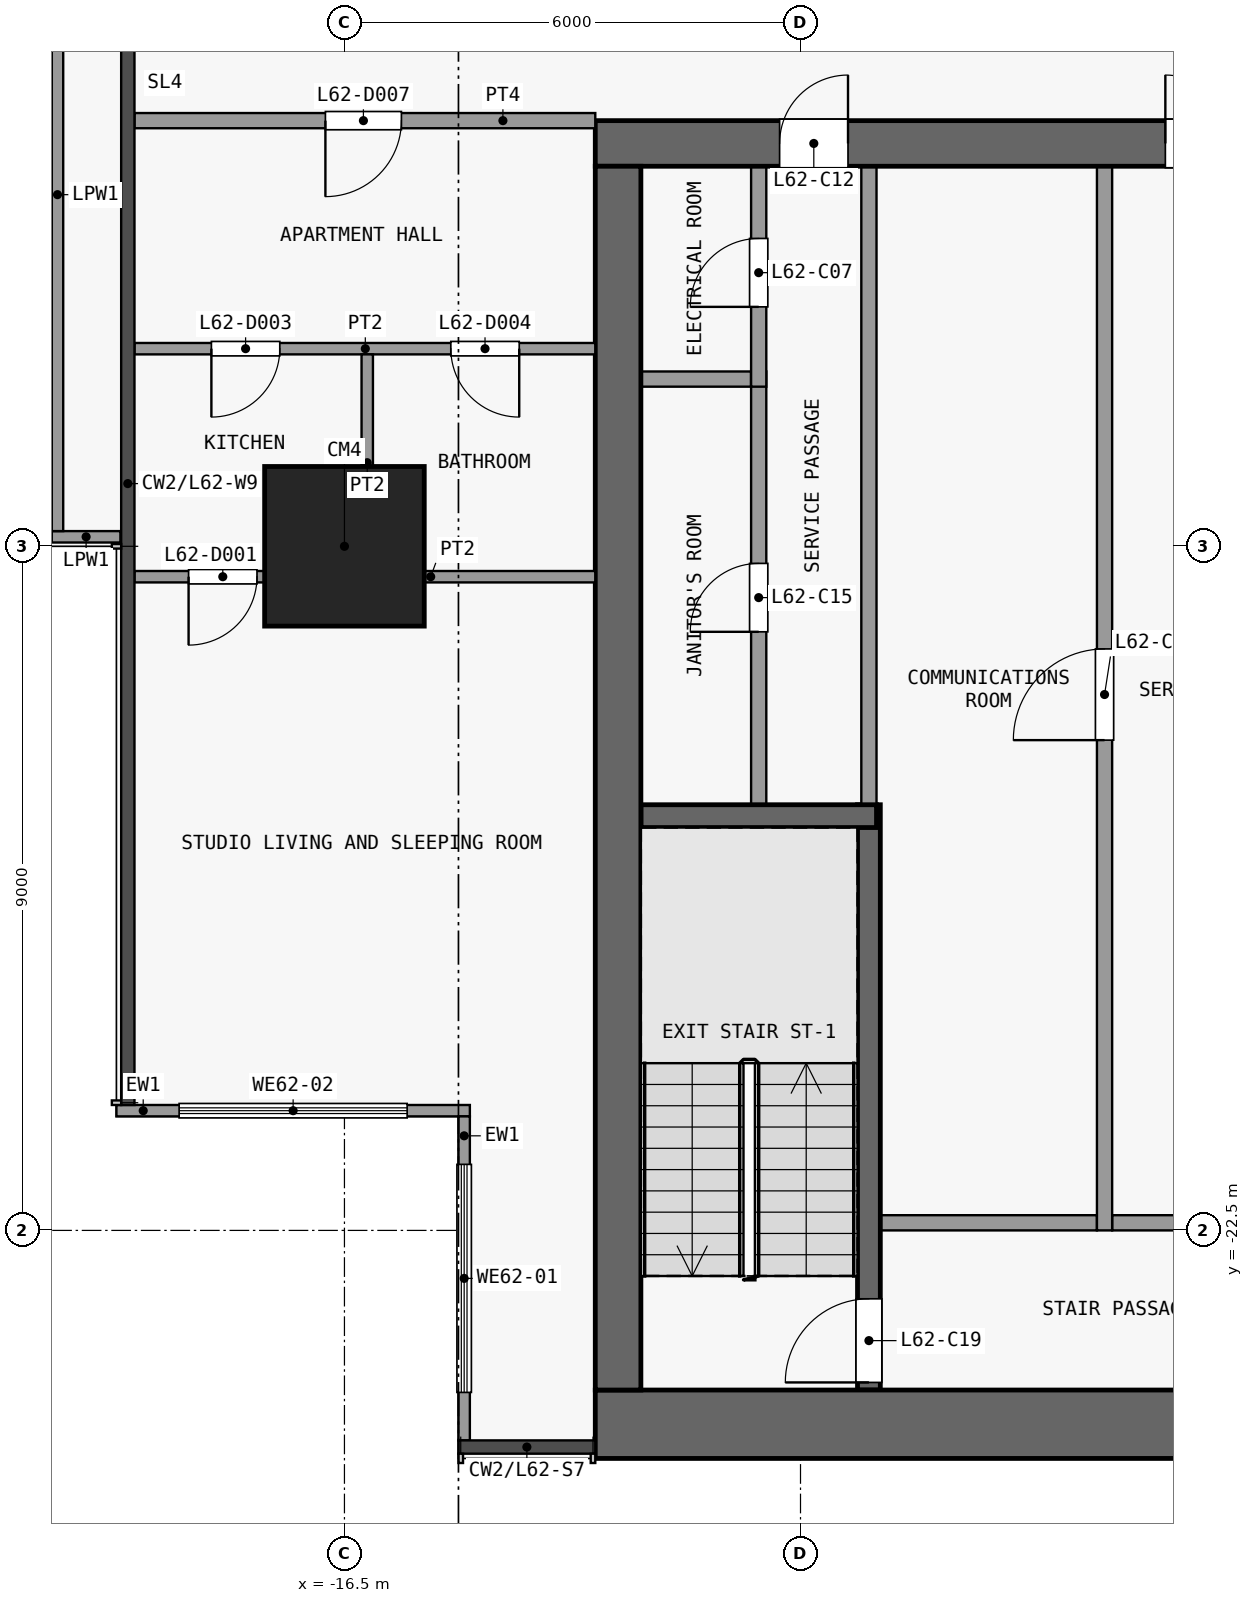
"""IFC4 building model, lengths in metres.
Left out: names, types, materials, properties, quantities, classifications, styles, units other than length and angle.
Written with IfcOpenShell. Run it as: python <this file> out.ifc"""

import sys

from ifc_helpers import new_model, si_unit, direction, frame, frame_2d, origin, origin_2d, place, context, subcontext, project, spatial, rectangle, extrude, element, fill, save


model = new_model("IFC4")
c1 = context("Model", 3, precision=1e-05, world=origin(), true_north=direction((0.0, 1.0)))
c2 = subcontext(c1, "Body", "Model", "MODEL_VIEW")
j1 = project(units=[si_unit("LENGTHUNIT", "METRE"), si_unit("PLANEANGLEUNIT", "RADIAN")], contexts=[c1])
p1 = place(None, origin())
s1 = spatial("IfcSite", under=j1, at=p1, CompositionType="ELEMENT")
p2 = place(p1, origin())
s2 = spatial("IfcBuilding", under=s1, at=p2, CompositionType="ELEMENT")
p3 = place(p2, frame((0.0, 0.0, 244.7)))
s3 = spatial("IfcBuildingStorey", under=s2, at=p3, CompositionType="ELEMENT", Elevation=244.7)
p4 = place(p3, frame((-16.5, -13.5, 0.0), z_axis=(0.0, 0.0, 1.0), x_axis=(1.0, 0.0, 0.0)))
e1 = element("IfcColumn", 1, at=p4, inside=s3, PredefinedType="COLUMN", context=c2, shape_type="SweptSolid", body=[
    extrude(rectangle(XDim=2.1, YDim=2.1, at=origin_2d()), origin(), (0.0, 0.0, 1.0), 3.6),
])
p5 = place(p3, frame((-13.2, -25.05, 0.0), z_axis=(0.0, 0.0, 1.0), x_axis=(1.0, 0.0, 0.0)))
e2 = element("IfcWall", 2, at=p5, inside=s3, PredefinedType="SHEAR", context=c2, shape_type="SweptSolid", body=[
    extrude(rectangle(XDim=26.4, YDim=0.9, at=frame_2d((13.2, 0.0))), origin(), (0.0, 0.0, 1.0), 3.15),
])
p6 = place(p3, frame((-13.2, -8.2, 0.0), z_axis=(0.0, 0.0, 1.0), x_axis=(1.0, 0.0, 0.0)))
e3 = element("IfcWall", 3, at=p6, inside=s3, PredefinedType="SHEAR", context=c2, shape_type="SweptSolid", body=[
    extrude(rectangle(XDim=26.4, YDim=0.6, at=frame_2d((13.2, 0.0))), origin(), (0.0, 0.0, 1.0), 3.15),
])
p7 = place(p6, frame((7.5, 0.0, 0.0)))
e4 = element("IfcOpeningElement", 4, at=p7, cuts=e3, PredefinedType="OPENING", context=c2, shape_type="SweptSolid", body=[
    extrude(rectangle(XDim=1.8, YDim=2.1, at=frame_2d((0.9, 1.05))), frame((0.0, 0.31, 0.0), z_axis=(0.0, -1.0, 0.0), x_axis=(1.0, 0.0, 0.0)), (0.0, 0.0, 1.0), 0.62),
])
p8 = place(p6, frame((17.1, 0.0, 0.0)))
e5 = element("IfcOpeningElement", 5, at=p8, cuts=e3, PredefinedType="OPENING", context=c2, shape_type="SweptSolid", body=[
    extrude(rectangle(XDim=1.8, YDim=2.1, at=frame_2d((0.9, 1.05))), frame((0.0, 0.31, 0.0), z_axis=(0.0, -1.0, 0.0), x_axis=(1.0, 0.0, 0.0)), (0.0, 0.0, 1.0), 0.62),
])
p9 = place(p6, frame((2.425, 0.0, 0.0)))
e6 = element("IfcOpeningElement", 6, at=p9, cuts=e3, PredefinedType="OPENING", context=c2, shape_type="SweptSolid", body=[
    extrude(rectangle(XDim=0.9, YDim=2.1, at=frame_2d((0.45, 1.05))), frame((0.0, 0.31, 0.0), z_axis=(0.0, -1.0, 0.0), x_axis=(1.0, 0.0, 0.0)), (0.0, 0.0, 1.0), 0.62),
])
p10 = place(p6, frame((23.075, 0.0, 0.0)))
e7 = element("IfcOpeningElement", 7, at=p10, cuts=e3, PredefinedType="OPENING", context=c2, shape_type="SweptSolid", body=[
    extrude(rectangle(XDim=0.9, YDim=2.1, at=frame_2d((0.45, 1.05))), frame((0.0, 0.31, 0.0), z_axis=(0.0, -1.0, 0.0), x_axis=(1.0, 0.0, 0.0)), (0.0, 0.0, 1.0), 0.62),
])
p11 = place(p3, frame((-12.9, -24.6, 0.0), z_axis=(0.0, 0.0, 1.0), x_axis=(0.0, 1.0, 0.0)))
e8 = element("IfcWall", 8, at=p11, inside=s3, PredefinedType="SHEAR", context=c2, shape_type="SweptSolid", body=[
    extrude(rectangle(XDim=16.1, YDim=0.6, at=frame_2d((8.05, 0.0))), origin(), (0.0, 0.0, 1.0), 3.15),
])
p12 = place(p3, frame((-9.45, -22.4, 0.0), z_axis=(0.0, 0.0, 1.0), x_axis=(1.0, 0.0, 0.0)))
e9 = element("IfcWall", 9, at=p12, inside=s3, PredefinedType="PARTITIONING", context=c2, shape_type="SweptSolid", body=[
    extrude(rectangle(XDim=2.85, YDim=0.2, at=frame_2d((1.425, 0.0))), origin(), (0.0, 0.0, 1.0), 3.15),
])
p13 = place(p3, frame((-3.25, -22.4, 0.0), z_axis=(0.0, 0.0, 1.0), x_axis=(-1.0, 0.0, 0.0)))
e10 = element("IfcWall", 10, at=p13, inside=s3, PredefinedType="PARTITIONING", context=c2, shape_type="SweptSolid", body=[
    extrude(rectangle(XDim=3.15, YDim=0.2, at=frame_2d((1.575, 0.0))), origin(), (0.0, 0.0, 1.0), 3.15),
])
p14 = place(p13, frame((0.8, 0.0, 0.0)))
e11 = element("IfcOpeningElement", 11, at=p14, cuts=e10, PredefinedType="OPENING", context=c2, shape_type="SweptSolid", body=[
    extrude(rectangle(XDim=1.5, YDim=2.1, at=frame_2d((0.75, 1.05))), frame((0.0, 0.11, 0.0), z_axis=(0.0, -1.0, 0.0), x_axis=(1.0, 0.0, 0.0)), (0.0, 0.0, 1.0), 0.22),
])
p15 = place(p3, frame((-12.6, -17.05, 0.0), z_axis=(0.0, 0.0, 1.0), x_axis=(1.0, 0.0, 0.0)))
e12 = element("IfcWall", 12, at=p15, inside=s3, PredefinedType="SHEAR", context=c2, shape_type="SweptSolid", body=[
    extrude(rectangle(XDim=3.1, YDim=0.3, at=frame_2d((1.55, 0.0))), origin(), (0.0, 0.0, 1.0), 3.15),
])
p16 = place(p3, frame((-12.6, -11.3, 0.0), z_axis=(0.0, 0.0, 1.0), x_axis=(1.0, 0.0, 0.0)))
e13 = element("IfcWall", 13, at=p16, inside=s3, PredefinedType="PARTITIONING", context=c2, shape_type="SweptSolid", body=[
    extrude(rectangle(XDim=1.45, YDim=0.2, at=frame_2d((0.725, 0.0))), origin(), (0.0, 0.0, 1.0), 3.15),
])
p17 = place(p3, frame((-11.05, -16.9, 0.0), z_axis=(0.0, 0.0, 1.0), x_axis=(0.0, 1.0, 0.0)))
e14 = element("IfcWall", 14, at=p17, inside=s3, PredefinedType="PARTITIONING", context=c2, shape_type="SweptSolid", body=[
    extrude(rectangle(XDim=5.7, YDim=0.2, at=frame_2d((2.85, 0.0))), origin(), (0.0, 0.0, 1.0), 3.15),
])
p18 = place(p17, frame((2.275, 0.0, 0.0)))
e15 = element("IfcOpeningElement", 15, at=p18, cuts=e14, PredefinedType="OPENING", context=c2, shape_type="SweptSolid", body=[
    extrude(rectangle(XDim=0.9, YDim=2.1, at=frame_2d((0.45, 1.05))), frame((0.0, 0.11, 0.0), z_axis=(0.0, -1.0, 0.0), x_axis=(1.0, 0.0, 0.0)), (0.0, 0.0, 1.0), 0.22),
])
p19 = place(p3, frame((-11.05, -11.4, 0.0), z_axis=(0.0, 0.0, 1.0), x_axis=(0.0, 1.0, 0.0)))
e16 = element("IfcWall", 16, at=p19, inside=s3, PredefinedType="PARTITIONING", context=c2, shape_type="SweptSolid", body=[
    extrude(rectangle(XDim=2.9, YDim=0.2, at=frame_2d((1.45, 0.0))), origin(), (0.0, 0.0, 1.0), 3.15),
])
p20 = place(p19, frame((1.05, 0.0, 0.0)))
e17 = element("IfcOpeningElement", 17, at=p20, cuts=e16, PredefinedType="OPENING", context=c2, shape_type="SweptSolid", body=[
    extrude(rectangle(XDim=0.9, YDim=2.1, at=frame_2d((0.45, 1.05))), frame((0.0, 0.11, 0.0), z_axis=(0.0, -1.0, 0.0), x_axis=(1.0, 0.0, 0.0)), (0.0, 0.0, 1.0), 0.22),
])
p21 = place(p3, frame((-9.6, -24.6, 0.0), z_axis=(0.0, 0.0, 1.0), x_axis=(0.0, 1.0, 0.0)))
e18 = element("IfcWall", 18, at=p21, inside=s3, PredefinedType="SHEAR", context=c2, shape_type="SweptSolid", body=[
    extrude(rectangle(XDim=7.7, YDim=0.3, at=frame_2d((3.85, 0.0))), origin(), (0.0, 0.0, 1.0), 3.15),
])
p22 = place(p21, frame((0.1, 0.0, 0.0)))
e19 = element("IfcOpeningElement", 19, at=p22, cuts=e18, PredefinedType="OPENING", context=c2, shape_type="SweptSolid", body=[
    extrude(rectangle(XDim=1.1, YDim=2.1, at=frame_2d((0.55, 1.05))), frame((0.0, 0.16, 0.0), z_axis=(0.0, -1.0, 0.0), x_axis=(1.0, 0.0, 0.0)), (0.0, 0.0, 1.0), 0.32),
])
p23 = place(p3, frame((-9.6, -16.9, 0.0), z_axis=(0.0, 0.0, 1.0), x_axis=(0.0, 1.0, 0.0)))
e20 = element("IfcWall", 20, at=p23, inside=s3, PredefinedType="PARTITIONING", context=c2, shape_type="SweptSolid", body=[
    extrude(rectangle(XDim=8.4, YDim=0.2, at=frame_2d((4.2, 0.0))), origin(), (0.0, 0.0, 1.0), 3.15),
])
p24 = place(p3, frame((-6.5, -22.5, 0.0), z_axis=(0.0, 0.0, 1.0), x_axis=(0.0, 1.0, 0.0)))
e21 = element("IfcWall", 21, at=p24, inside=s3, PredefinedType="PARTITIONING", context=c2, shape_type="SweptSolid", body=[
    extrude(rectangle(XDim=14.0, YDim=0.2, at=frame_2d((7.0, 0.0))), origin(), (0.0, 0.0, 1.0), 3.15),
])
p25 = place(p24, frame((6.45, 0.0, 0.0)))
e22 = element("IfcOpeningElement", 22, at=p25, cuts=e21, PredefinedType="OPENING", context=c2, shape_type="SweptSolid", body=[
    extrude(rectangle(XDim=1.2, YDim=2.1, at=frame_2d((0.6, 1.05))), frame((0.0, 0.11, 0.0), z_axis=(0.0, -1.0, 0.0), x_axis=(1.0, 0.0, 0.0)), (0.0, 0.0, 1.0), 0.22),
])
p26 = place(p3, frame((-14.925, -25.262, 0.0), z_axis=(0.0, 0.0, 1.0), x_axis=(0.0, 1.0, 0.0)))
e23 = element("IfcWall", 23, at=p26, inside=s3, PredefinedType="SOLIDWALL", context=c2, shape_type="SweptSolid", body=[
    extrude(rectangle(XDim=4.262, YDim=0.15, at=frame_2d((2.131, 0.0))), origin(), (0.0, 0.0, 1.0), 3.15),
])
p27 = place(p26, frame((0.631, 0.0, 0.9)))
e24 = element("IfcOpeningElement", 24, at=p27, cuts=e23, PredefinedType="OPENING", context=c2, shape_type="SweptSolid", body=[
    extrude(rectangle(XDim=3.0, YDim=2.4, at=frame_2d((1.5, 1.2))), frame((0.0, 0.085, 0.0), z_axis=(0.0, -1.0, 0.0), x_axis=(1.0, 0.0, 0.0)), (0.0, 0.0, 1.0), 0.17),
])
p28 = place(p3, frame((-14.85, -20.925, 0.0), z_axis=(0.0, 0.0, 1.0), x_axis=(-1.0, 0.0, 0.0)))
e25 = element("IfcWall", 25, at=p28, inside=s3, PredefinedType="SOLIDWALL", context=c2, shape_type="SweptSolid", body=[
    extrude(rectangle(XDim=4.65, YDim=0.15, at=frame_2d((2.325, 0.0))), origin(), (0.0, 0.0, 1.0), 3.15),
])
p29 = place(p28, frame((0.825, 0.0, 0.9)))
e26 = element("IfcOpeningElement", 26, at=p29, cuts=e25, PredefinedType="OPENING", context=c2, shape_type="SweptSolid", body=[
    extrude(rectangle(XDim=3.0, YDim=2.4, at=frame_2d((1.5, 1.2))), frame((0.0, 0.085, 0.0), z_axis=(0.0, -1.0, 0.0), x_axis=(1.0, 0.0, 0.0)), (0.0, 0.0, 1.0), 0.17),
])
p30 = place(p3, frame((-19.448, -13.375, 0.0), z_axis=(0.0, 0.0, 1.0), x_axis=(-1.0, 0.0, 0.0)))
e27 = element("IfcWall", 27, at=p30, inside=s3, PredefinedType="PARAPET", context=c2, shape_type="SweptSolid", body=[
    extrude(rectangle(XDim=0.903, YDim=0.15, at=frame_2d((0.451, 0.0))), origin(), (0.0, 0.0, 1.0), 1.15),
])
p31 = place(p3, frame((-20.275, -13.3, 0.0), z_axis=(0.0, 0.0, 1.0), x_axis=(0.0, 1.0, 0.0)))
e28 = element("IfcWall", 28, at=p31, inside=s3, PredefinedType="PARAPET", context=c2, shape_type="SweptSolid", body=[
    extrude(rectangle(XDim=8.853, YDim=0.15, at=frame_2d((4.426, 0.0))), origin(), (0.0, 0.0, 1.0), 1.15),
])
p32 = place(p3, frame((-19.262, -13.9, 0.0), z_axis=(0.0, 0.0, 1.0), x_axis=(1.0, 0.0, 0.0)))
e29 = element("IfcWall", 29, at=p32, inside=s3, PredefinedType="PARTITIONING", context=c2, shape_type="SweptSolid", body=[
    extrude(rectangle(XDim=6.062, YDim=0.15, at=frame_2d((3.031, 0.0))), origin(), (0.0, 0.0, 1.0), 3.15),
])
p33 = place(p32, frame((0.712, 0.0, 0.0)))
e30 = element("IfcOpeningElement", 30, at=p33, cuts=e29, PredefinedType="OPENING", context=c2, shape_type="SweptSolid", body=[
    extrude(rectangle(XDim=0.9, YDim=2.1, at=frame_2d((0.45, 1.05))), frame((0.0, 0.085, 0.0), z_axis=(0.0, -1.0, 0.0), x_axis=(1.0, 0.0, 0.0)), (0.0, 0.0, 1.0), 0.17),
])
p34 = place(p3, frame((-19.262, -10.9, 0.0), z_axis=(0.0, 0.0, 1.0), x_axis=(1.0, 0.0, 0.0)))
e31 = element("IfcWall", 31, at=p34, inside=s3, PredefinedType="PARTITIONING", context=c2, shape_type="SweptSolid", body=[
    extrude(rectangle(XDim=6.062, YDim=0.15, at=frame_2d((3.031, 0.0))), origin(), (0.0, 0.0, 1.0), 3.15),
])
p35 = place(p34, frame((1.012, 0.0, 0.0)))
e32 = element("IfcOpeningElement", 32, at=p35, cuts=e31, PredefinedType="OPENING", context=c2, shape_type="SweptSolid", body=[
    extrude(rectangle(XDim=0.9, YDim=2.1, at=frame_2d((0.45, 1.05))), frame((0.0, 0.085, 0.0), z_axis=(0.0, -1.0, 0.0), x_axis=(1.0, 0.0, 0.0)), (0.0, 0.0, 1.0), 0.17),
])
p36 = place(p34, frame((4.162, 0.0, 0.0)))
e33 = element("IfcOpeningElement", 33, at=p36, cuts=e31, PredefinedType="OPENING", context=c2, shape_type="SweptSolid", body=[
    extrude(rectangle(XDim=0.9, YDim=2.1, at=frame_2d((0.45, 1.05))), frame((0.0, 0.085, 0.0), z_axis=(0.0, -1.0, 0.0), x_axis=(1.0, 0.0, 0.0)), (0.0, 0.0, 1.0), 0.17),
])
p37 = place(p3, frame((-19.262, -7.9, 0.0), z_axis=(0.0, 0.0, 1.0), x_axis=(1.0, 0.0, 0.0)))
e34 = element("IfcWall", 34, at=p37, inside=s3, PredefinedType="PARTITIONING", context=c2, shape_type="SweptSolid", body=[
    extrude(rectangle(XDim=6.062, YDim=0.2, at=frame_2d((3.031, 0.0))), origin(), (0.0, 0.0, 1.0), 3.15),
])
p38 = place(p37, frame((2.512, 0.0, 0.0)))
e35 = element("IfcOpeningElement", 35, at=p38, cuts=e34, PredefinedType="OPENING", context=c2, shape_type="SweptSolid", body=[
    extrude(rectangle(XDim=1.0, YDim=2.1, at=frame_2d((0.5, 1.05))), frame((0.0, 0.11, 0.0), z_axis=(0.0, -1.0, 0.0), x_axis=(1.0, 0.0, 0.0)), (0.0, 0.0, 1.0), 0.22),
])
p39 = place(p3, frame((-16.2, -13.825, 0.0), z_axis=(0.0, 0.0, 1.0), x_axis=(0.0, 1.0, 0.0)))
e36 = element("IfcWall", 36, at=p39, inside=s3, PredefinedType="PARTITIONING", context=c2, shape_type="SweptSolid", body=[
    extrude(rectangle(XDim=2.85, YDim=0.15, at=frame_2d((1.425, 0.0))), origin(), (0.0, 0.0, 1.0), 3.15),
])
p40 = place(p7, origin())
e37 = element("IfcDoor", 37, at=p40, inside=s3, OperationType="DOUBLE_DOOR_SINGLE_SWING", PredefinedType="DOOR", context=c2, shape_type="SweptSolid", body=[
    extrude(rectangle(XDim=1.8, YDim=2.1, at=frame_2d((0.9, 1.05))), frame((0.0, 0.025, 0.0), z_axis=(0.0, -1.0, 0.0), x_axis=(1.0, 0.0, 0.0)), (0.0, 0.0, 1.0), 0.05),
])
fill(e4, e37)
p41 = place(p20, origin())
e38 = element("IfcDoor", 38, at=p41, inside=s3, OperationType="SINGLE_SWING_LEFT", PredefinedType="DOOR", context=c2, shape_type="SweptSolid", body=[
    extrude(rectangle(XDim=0.9, YDim=2.1, at=frame_2d((0.45, 1.05))), frame((0.0, 0.025, 0.0), z_axis=(0.0, -1.0, 0.0), x_axis=(1.0, 0.0, 0.0)), (0.0, 0.0, 1.0), 0.05),
])
fill(e17, e38)
p42 = place(p25, origin())
e39 = element("IfcDoor", 39, at=p42, inside=s3, OperationType="SINGLE_SWING_LEFT", PredefinedType="DOOR", context=c2, shape_type="SweptSolid", body=[
    extrude(rectangle(XDim=1.2, YDim=2.1, at=frame_2d((0.6, 1.05))), frame((0.0, 0.025, 0.0), z_axis=(0.0, -1.0, 0.0), x_axis=(1.0, 0.0, 0.0)), (0.0, 0.0, 1.0), 0.05),
])
fill(e22, e39)
p43 = place(p9, origin())
e40 = element("IfcDoor", 40, at=p43, inside=s3, OperationType="SINGLE_SWING_RIGHT", PredefinedType="DOOR", context=c2, shape_type="SweptSolid", body=[
    extrude(rectangle(XDim=0.9, YDim=2.1, at=frame_2d((0.45, 1.05))), frame((0.0, 0.025, 0.0), z_axis=(0.0, -1.0, 0.0), x_axis=(1.0, 0.0, 0.0)), (0.0, 0.0, 1.0), 0.05),
])
fill(e6, e40)
p44 = place(p18, origin())
e41 = element("IfcDoor", 41, at=p44, inside=s3, OperationType="SINGLE_SWING_LEFT", PredefinedType="DOOR", context=c2, shape_type="SweptSolid", body=[
    extrude(rectangle(XDim=0.9, YDim=2.1, at=frame_2d((0.45, 1.05))), frame((0.0, 0.025, 0.0), z_axis=(0.0, -1.0, 0.0), x_axis=(1.0, 0.0, 0.0)), (0.0, 0.0, 1.0), 0.05),
])
fill(e15, e41)
p45 = place(p22, origin())
e42 = element("IfcDoor", 42, at=p45, inside=s3, OperationType="SINGLE_SWING_LEFT", PredefinedType="DOOR", context=c2, shape_type="SweptSolid", body=[
    extrude(rectangle(XDim=1.1, YDim=2.1, at=frame_2d((0.55, 1.05))), frame((0.0, 0.025, 0.0), z_axis=(0.0, -1.0, 0.0), x_axis=(1.0, 0.0, 0.0)), (0.0, 0.0, 1.0), 0.05),
])
fill(e19, e42)
p46 = place(p27, origin())
e43 = element("IfcWindow", 43, at=p46, inside=s3, PartitioningType="SINGLE_PANEL", PredefinedType="WINDOW", context=c2, shape_type="SweptSolid", body=[
    extrude(rectangle(XDim=3.0, YDim=2.4, at=frame_2d((1.5, 1.2))), frame((0.0, 0.03, 0.0), z_axis=(0.0, -1.0, 0.0), x_axis=(1.0, 0.0, 0.0)), (0.0, 0.0, 1.0), 0.06),
])
fill(e24, e43)
p47 = place(p29, origin())
e44 = element("IfcWindow", 44, at=p47, inside=s3, PartitioningType="SINGLE_PANEL", PredefinedType="WINDOW", context=c2, shape_type="SweptSolid", body=[
    extrude(rectangle(XDim=3.0, YDim=2.4, at=frame_2d((1.5, 1.2))), frame((0.0, 0.03, 0.0), z_axis=(0.0, -1.0, 0.0), x_axis=(1.0, 0.0, 0.0)), (0.0, 0.0, 1.0), 0.06),
])
fill(e26, e44)
p48 = place(p33, origin())
e45 = element("IfcDoor", 45, at=p48, inside=s3, OperationType="SINGLE_SWING_LEFT", PredefinedType="DOOR", context=c2, shape_type="SweptSolid", body=[
    extrude(rectangle(XDim=0.9, YDim=2.1, at=frame_2d((0.45, 1.05))), frame((0.0, 0.025, 0.0), z_axis=(0.0, -1.0, 0.0), x_axis=(1.0, 0.0, 0.0)), (0.0, 0.0, 1.0), 0.05),
])
fill(e30, e45)
p49 = place(p35, origin())
e46 = element("IfcDoor", 46, at=p49, inside=s3, OperationType="SINGLE_SWING_LEFT", PredefinedType="DOOR", context=c2, shape_type="SweptSolid", body=[
    extrude(rectangle(XDim=0.9, YDim=2.1, at=frame_2d((0.45, 1.05))), frame((0.0, 0.025, 0.0), z_axis=(0.0, -1.0, 0.0), x_axis=(1.0, 0.0, 0.0)), (0.0, 0.0, 1.0), 0.05),
])
fill(e32, e46)
p50 = place(p36, origin())
e47 = element("IfcDoor", 47, at=p50, inside=s3, OperationType="SINGLE_SWING_RIGHT", PredefinedType="DOOR", context=c2, shape_type="SweptSolid", body=[
    extrude(rectangle(XDim=0.9, YDim=2.1, at=frame_2d((0.45, 1.05))), frame((0.0, 0.025, 0.0), z_axis=(0.0, -1.0, 0.0), x_axis=(1.0, 0.0, 0.0)), (0.0, 0.0, 1.0), 0.05),
])
fill(e33, e47)
p51 = place(p38, origin())
e48 = element("IfcDoor", 48, at=p51, inside=s3, OperationType="SINGLE_SWING_LEFT", PredefinedType="DOOR", context=c2, shape_type="SweptSolid", body=[
    extrude(rectangle(XDim=1.0, YDim=2.1, at=frame_2d((0.5, 1.05))), frame((0.0, 0.025, 0.0), z_axis=(0.0, -1.0, 0.0), x_axis=(1.0, 0.0, 0.0)), (0.0, 0.0, 1.0), 0.05),
])
fill(e35, e48)
save(model, sys.argv[1])
